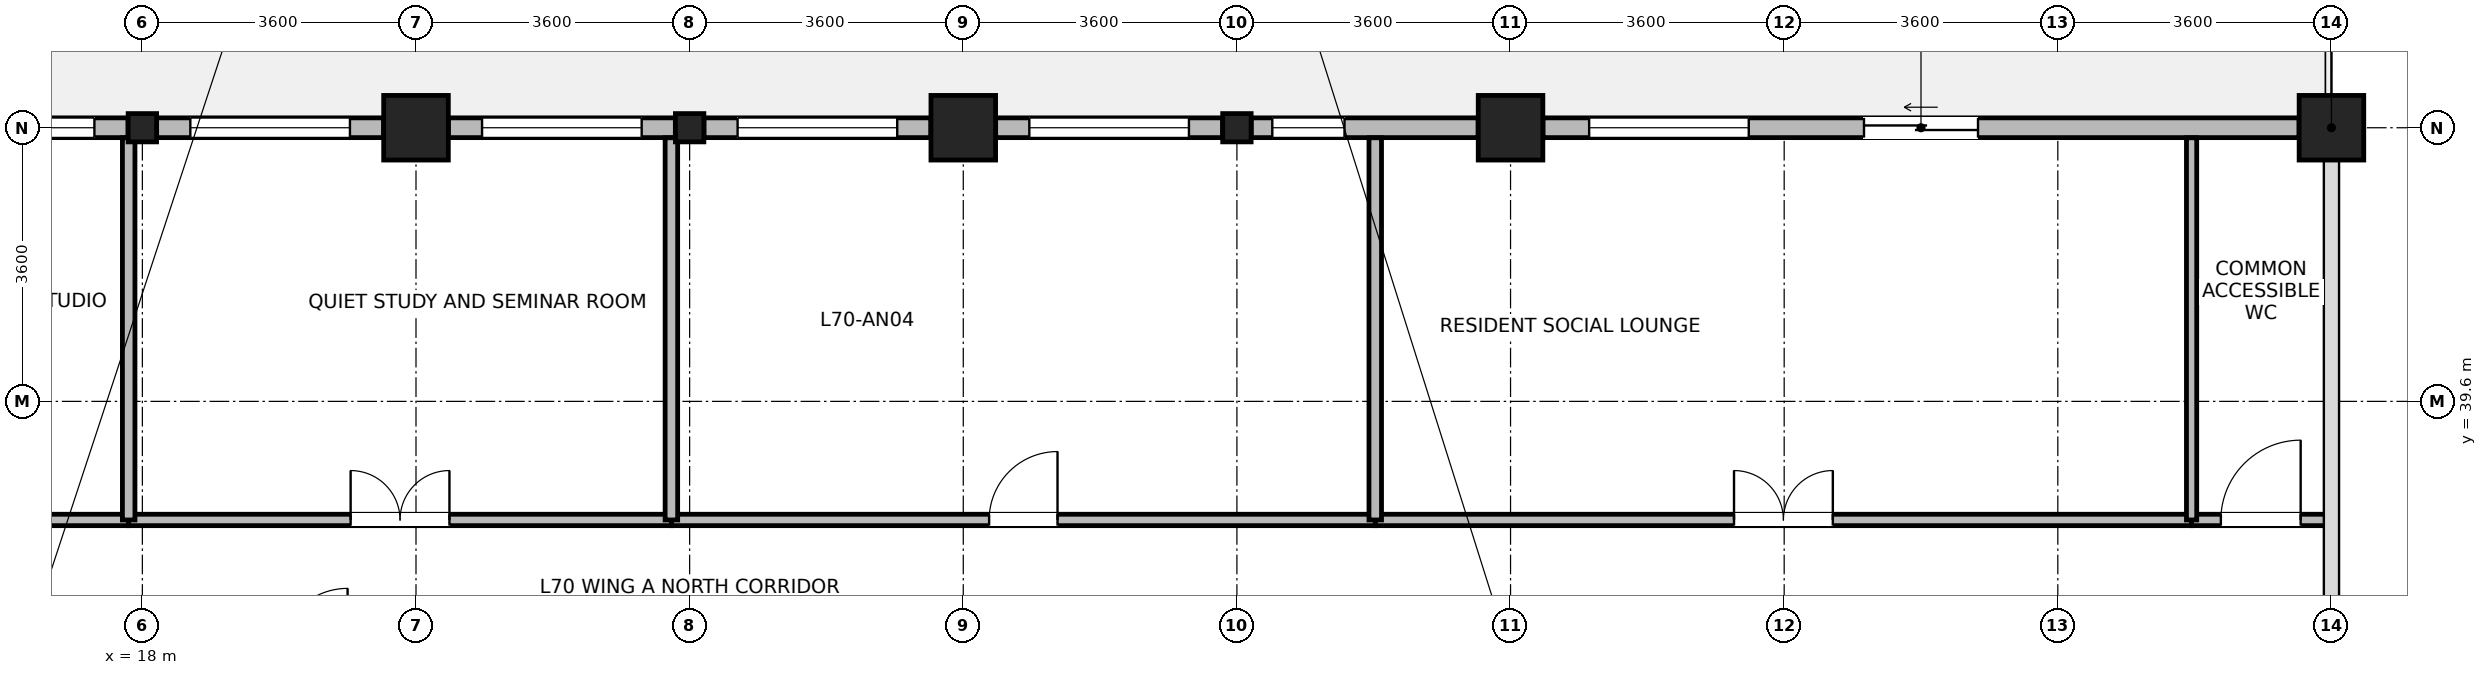
"""IFC4 building model, lengths in metres.
Left out: names, types, materials, properties, quantities, classifications, styles, units other than length and angle.
Written with IfcOpenShell. Run it as: python <this file> out.ifc"""

import sys

from ifc_helpers import new_model, si_unit, direction, frame, frame_2d, origin, origin_2d, place, context, subcontext, project, spatial, rectangle, i_section, extrude, source, transform, mapped, element, fill, save


model = new_model("IFC4")
c1 = context("Model", 3, precision=1e-05, world=origin(), true_north=direction((0.0, 1.0)))
c2 = subcontext(c1, "Body", "Model", "MODEL_VIEW")
j1 = project(units=[si_unit("LENGTHUNIT", "METRE"), si_unit("PLANEANGLEUNIT", "RADIAN")], contexts=[c1])
p1 = place(None, origin())
s1 = spatial("IfcSite", under=j1, at=p1, CompositionType="ELEMENT")
p2 = place(p1, origin())
s2 = spatial("IfcBuilding", under=s1, at=p2, CompositionType="ELEMENT")
p3 = place(p2, frame((0.0, 0.0, 272.1)))
s3 = spatial("IfcBuildingStorey", under=s2, at=p3, CompositionType="ELEMENT", Elevation=272.1)
m1 = source(origin(), c2, "Body", "SweptSolid", [
    extrude(rectangle(XDim=0.85, YDim=0.85, at=origin_2d()), origin(), (0.0, 0.0, 1.0), 3.7),
])
for number, where, z_axis, x_axis in (
    (1, (21.6, 43.2, 0.0), (0.0, 0.0, 1.0), (1.0, 0.0, 0.0)),
    (2, (28.8, 43.2, 0.0), (0.0, 0.0, 1.0), (1.0, 0.0, 0.0)),
    (3, (36.0, 43.2, 0.0), (0.0, 0.0, 1.0), (1.0, 0.0, 0.0)),
    (4, (46.8, 43.2, 0.0), (0.0, 0.0, 1.0), (1.0, 0.0, 0.0)),
):
    element("IfcColumn", number, at=place(p3, frame(where, z_axis=z_axis, x_axis=x_axis)), inside=s3, PredefinedType="COLUMN", context=c2, shape_type="MappedRepresentation", body=[
        mapped(m1, transform((0.0, 0.0, 0.0), x_axis=(1.0, 0.0, 0.0), y_axis=(0.0, 1.0, 0.0), z_axis=(0.0, 0.0, 1.0), scale=1.0)),
    ])
m2 = source(origin(), c2, "Body", "SweptSolid", [
    extrude(i_section(OverallWidth=0.374, OverallDepth=0.372, WebThickness=0.015, FlangeThickness=0.026, FilletRadius=0.015, at=origin_2d()), origin(), (0.0, 0.0, 1.0), 3.7),
])
for number, where, z_axis, x_axis in (
    (5, (18.0, 43.2, 0.0), (0.0, 0.0, 1.0), (1.0, 0.0, 0.0)),
    (6, (25.2, 43.2, 0.0), (0.0, 0.0, 1.0), (1.0, 0.0, 0.0)),
    (7, (32.4, 43.2, 0.0), (0.0, 0.0, 1.0), (1.0, 0.0, 0.0)),
):
    element("IfcColumn", number, at=place(p3, frame(where, z_axis=z_axis, x_axis=x_axis)), inside=s3, PredefinedType="COLUMN", context=c2, shape_type="MappedRepresentation", body=[
        mapped(m2, transform((0.0, 0.0, 0.0), x_axis=(1.0, 0.0, 0.0), y_axis=(0.0, 1.0, 0.0), z_axis=(0.0, 0.0, 1.0), scale=1.0)),
    ])
p4 = place(p3, frame((36.426, 43.2, 0.0), z_axis=(0.0, 0.0, 1.0), x_axis=(1.0, 0.0, 0.0)))
e8 = element("IfcWall", 8, at=p4, inside=s3, PredefinedType="STANDARD", context=c2, shape_type="SweptSolid", body=[
    extrude(rectangle(XDim=9.948, YDim=0.26, at=frame_2d((4.974, 0.0))), origin(), (0.0, 0.0, 1.0), 3.055),
])
p5 = place(p4, frame((4.224, 0.0, 0.0)))
e9 = element("IfcOpeningElement", 9, at=p5, cuts=e8, PredefinedType="OPENING", context=c2, shape_type="SweptSolid", body=[
    extrude(rectangle(XDim=1.5, YDim=2.15, at=frame_2d((0.75, 1.075))), frame((0.0, 0.14, 0.0), z_axis=(0.0, -1.0, 0.0), x_axis=(1.0, 0.0, 0.0)), (0.0, 0.0, 1.0), 0.28),
])
p6 = place(p4, frame((0.608, 0.0, 0.85)))
e10 = element("IfcOpeningElement", 10, at=p6, cuts=e8, PredefinedType="OPENING", context=c2, shape_type="SweptSolid", body=[
    extrude(rectangle(XDim=2.1, YDim=1.95, at=frame_2d((1.05, 0.975))), frame((0.0, 0.14, 0.0), z_axis=(0.0, -1.0, 0.0), x_axis=(1.0, 0.0, 0.0)), (0.0, 0.0, 1.0), 0.28),
])
p7 = place(p3, frame((32.588, 43.2, 0.0), z_axis=(0.0, 0.0, 1.0), x_axis=(1.0, 0.0, 0.0)))
e11 = element("IfcWall", 11, at=p7, inside=s3, PredefinedType="STANDARD", context=c2, shape_type="SweptSolid", body=[
    extrude(rectangle(XDim=2.986, YDim=0.26, at=frame_2d((1.493, 0.0))), origin(), (0.0, 0.0, 1.0), 3.055),
])
p8 = place(p7, frame((0.278, 0.0, 0.85)))
e12 = element("IfcOpeningElement", 12, at=p8, cuts=e11, PredefinedType="OPENING", context=c2, shape_type="SweptSolid", body=[
    extrude(rectangle(XDim=0.95, YDim=1.75, at=frame_2d((0.475, 0.875))), frame((0.0, 0.14, 0.0), z_axis=(0.0, -1.0, 0.0), x_axis=(1.0, 0.0, 0.0)), (0.0, 0.0, 1.0), 0.28),
])
p9 = place(p3, frame((29.226, 43.2, 0.0), z_axis=(0.0, 0.0, 1.0), x_axis=(1.0, 0.0, 0.0)))
e13 = element("IfcWall", 13, at=p9, inside=s3, PredefinedType="STANDARD", context=c2, shape_type="SweptSolid", body=[
    extrude(rectangle(XDim=2.986, YDim=0.26, at=frame_2d((1.493, 0.0))), origin(), (0.0, 0.0, 1.0), 3.055),
])
p10 = place(p9, frame((0.443, 0.0, 0.85)))
e14 = element("IfcOpeningElement", 14, at=p10, cuts=e13, PredefinedType="OPENING", context=c2, shape_type="SweptSolid", body=[
    extrude(rectangle(XDim=2.1, YDim=1.95, at=frame_2d((1.05, 0.975))), frame((0.0, 0.14, 0.0), z_axis=(0.0, -1.0, 0.0), x_axis=(1.0, 0.0, 0.0)), (0.0, 0.0, 1.0), 0.28),
])
p11 = place(p3, frame((25.388, 43.2, 0.0), z_axis=(0.0, 0.0, 1.0), x_axis=(1.0, 0.0, 0.0)))
e15 = element("IfcWall", 15, at=p11, inside=s3, PredefinedType="STANDARD", context=c2, shape_type="SweptSolid", body=[
    extrude(rectangle(XDim=2.986, YDim=0.26, at=frame_2d((1.493, 0.0))), origin(), (0.0, 0.0, 1.0), 3.055),
])
p12 = place(p11, frame((0.443, 0.0, 0.85)))
e16 = element("IfcOpeningElement", 16, at=p12, cuts=e15, PredefinedType="OPENING", context=c2, shape_type="SweptSolid", body=[
    extrude(rectangle(XDim=2.1, YDim=1.95, at=frame_2d((1.05, 0.975))), frame((0.0, 0.14, 0.0), z_axis=(0.0, -1.0, 0.0), x_axis=(1.0, 0.0, 0.0)), (0.0, 0.0, 1.0), 0.28),
])
p13 = place(p3, frame((22.026, 43.2, 0.0), z_axis=(0.0, 0.0, 1.0), x_axis=(1.0, 0.0, 0.0)))
e17 = element("IfcWall", 17, at=p13, inside=s3, PredefinedType="STANDARD", context=c2, shape_type="SweptSolid", body=[
    extrude(rectangle(XDim=2.986, YDim=0.26, at=frame_2d((1.493, 0.0))), origin(), (0.0, 0.0, 1.0), 3.055),
])
p14 = place(p13, frame((0.443, 0.0, 0.85)))
e18 = element("IfcOpeningElement", 18, at=p14, cuts=e17, PredefinedType="OPENING", context=c2, shape_type="SweptSolid", body=[
    extrude(rectangle(XDim=2.1, YDim=1.95, at=frame_2d((1.05, 0.975))), frame((0.0, 0.14, 0.0), z_axis=(0.0, -1.0, 0.0), x_axis=(1.0, 0.0, 0.0)), (0.0, 0.0, 1.0), 0.28),
])
p15 = place(p3, frame((18.188, 43.2, 0.0), z_axis=(0.0, 0.0, 1.0), x_axis=(1.0, 0.0, 0.0)))
e19 = element("IfcWall", 19, at=p15, inside=s3, PredefinedType="STANDARD", context=c2, shape_type="SweptSolid", body=[
    extrude(rectangle(XDim=2.986, YDim=0.26, at=frame_2d((1.493, 0.0))), origin(), (0.0, 0.0, 1.0), 3.055),
])
p16 = place(p15, frame((0.443, 0.0, 0.85)))
e20 = element("IfcOpeningElement", 20, at=p16, cuts=e19, PredefinedType="OPENING", context=c2, shape_type="SweptSolid", body=[
    extrude(rectangle(XDim=2.1, YDim=1.95, at=frame_2d((1.05, 0.975))), frame((0.0, 0.14, 0.0), z_axis=(0.0, -1.0, 0.0), x_axis=(1.0, 0.0, 0.0)), (0.0, 0.0, 1.0), 0.28),
])
p17 = place(p3, frame((14.826, 43.2, 0.0), z_axis=(0.0, 0.0, 1.0), x_axis=(1.0, 0.0, 0.0)))
e21 = element("IfcWall", 21, at=p17, inside=s3, PredefinedType="STANDARD", context=c2, shape_type="SweptSolid", body=[
    extrude(rectangle(XDim=2.986, YDim=0.26, at=frame_2d((1.493, 0.0))), origin(), (0.0, 0.0, 1.0), 3.055),
])
p18 = place(p17, frame((0.443, 0.0, 0.85)))
e22 = element("IfcOpeningElement", 22, at=p18, cuts=e21, PredefinedType="OPENING", context=c2, shape_type="SweptSolid", body=[
    extrude(rectangle(XDim=2.1, YDim=1.95, at=frame_2d((1.05, 0.975))), frame((0.0, 0.14, 0.0), z_axis=(0.0, -1.0, 0.0), x_axis=(1.0, 0.0, 0.0)), (0.0, 0.0, 1.0), 0.28),
])
p19 = place(p3, frame((34.22, 38.04, 0.0), z_axis=(0.0, 0.0, 1.0), x_axis=(1.0, 0.0, 0.0)))
e23 = element("IfcWall", 23, at=p19, inside=s3, PredefinedType="PARTITIONING", context=c2, shape_type="SweptSolid", body=[
    extrude(rectangle(XDim=10.74, YDim=0.15, at=frame_2d((5.37, 0.0))), origin(), (0.0, 0.0, 1.0), 3.455),
])
p20 = place(p19, frame((4.72, 0.0, 0.0)))
e24 = element("IfcOpeningElement", 24, at=p20, cuts=e23, PredefinedType="OPENING", context=c2, shape_type="SweptSolid", body=[
    extrude(rectangle(XDim=1.3, YDim=2.12, at=frame_2d((0.65, 1.06))), frame((0.0, 0.085, 0.0), z_axis=(0.0, -1.0, 0.0), x_axis=(1.0, 0.0, 0.0)), (0.0, 0.0, 1.0), 0.17),
])
p21 = place(p3, frame((24.96, 38.04, 0.0), z_axis=(0.0, 0.0, 1.0), x_axis=(1.0, 0.0, 0.0)))
e25 = element("IfcWall", 25, at=p21, inside=s3, PredefinedType="PARTITIONING", context=c2, shape_type="SweptSolid", body=[
    extrude(rectangle(XDim=9.26, YDim=0.15, at=frame_2d((4.63, 0.0))), origin(), (0.0, 0.0, 1.0), 3.455),
])
p22 = place(p21, frame((4.18, 0.0, 0.0)))
e26 = element("IfcOpeningElement", 26, at=p22, cuts=e25, PredefinedType="OPENING", context=c2, shape_type="SweptSolid", body=[
    extrude(rectangle(XDim=0.9, YDim=2.08, at=frame_2d((0.45, 1.04))), frame((0.0, 0.085, 0.0), z_axis=(0.0, -1.0, 0.0), x_axis=(1.0, 0.0, 0.0)), (0.0, 0.0, 1.0), 0.17),
])
p23 = place(p3, frame((10.12, 38.04, 0.0), z_axis=(0.0, 0.0, 1.0), x_axis=(1.0, 0.0, 0.0)))
e27 = element("IfcWall", 27, at=p23, inside=s3, PredefinedType="PARTITIONING", context=c2, shape_type="SweptSolid", body=[
    extrude(rectangle(XDim=7.7, YDim=0.15, at=frame_2d((3.85, 0.0))), origin(), (0.0, 0.0, 1.0), 3.455),
])
p24 = place(p23, frame((3.325, 0.0, 0.0)))
e28 = element("IfcOpeningElement", 28, at=p24, cuts=e27, PredefinedType="OPENING", context=c2, shape_type="SweptSolid", body=[
    extrude(rectangle(XDim=1.05, YDim=2.12, at=frame_2d((0.525, 1.06))), frame((0.0, 0.085, 0.0), z_axis=(0.0, -1.0, 0.0), x_axis=(1.0, 0.0, 0.0)), (0.0, 0.0, 1.0), 0.17),
])
p25 = place(p3, frame((17.82, 38.04, 0.0), z_axis=(0.0, 0.0, 1.0), x_axis=(1.0, 0.0, 0.0)))
e29 = element("IfcWall", 29, at=p25, inside=s3, PredefinedType="PARTITIONING", context=c2, shape_type="SweptSolid", body=[
    extrude(rectangle(XDim=7.14, YDim=0.15, at=frame_2d((3.57, 0.0))), origin(), (0.0, 0.0, 1.0), 3.455),
])
p26 = place(p25, frame((2.92, 0.0, 0.0)))
e30 = element("IfcOpeningElement", 30, at=p26, cuts=e29, PredefinedType="OPENING", context=c2, shape_type="SweptSolid", body=[
    extrude(rectangle(XDim=1.3, YDim=2.12, at=frame_2d((0.65, 1.06))), frame((0.0, 0.085, 0.0), z_axis=(0.0, -1.0, 0.0), x_axis=(1.0, 0.0, 0.0)), (0.0, 0.0, 1.0), 0.17),
])
p27 = place(p3, frame((44.96, 38.04, 0.0), z_axis=(0.0, 0.0, 1.0), x_axis=(1.0, 0.0, 0.0)))
e31 = element("IfcWall", 31, at=p27, inside=s3, PredefinedType="PARTITIONING", context=c2, shape_type="SweptSolid", body=[
    extrude(rectangle(XDim=1.82, YDim=0.15, at=frame_2d((0.91, 0.0))), origin(), (0.0, 0.0, 1.0), 3.455),
])
p28 = place(p27, frame((0.385, 0.0, 0.0)))
e32 = element("IfcOpeningElement", 32, at=p28, cuts=e31, PredefinedType="OPENING", context=c2, shape_type="SweptSolid", body=[
    extrude(rectangle(XDim=1.05, YDim=2.12, at=frame_2d((0.525, 1.06))), frame((0.0, 0.085, 0.0), z_axis=(0.0, -1.0, 0.0), x_axis=(1.0, 0.0, 0.0)), (0.0, 0.0, 1.0), 0.17),
])
p29 = place(p3, frame((17.82, 38.04, 0.0), z_axis=(0.0, 0.0, 1.0), x_axis=(0.0, 1.0, 0.0)))
e33 = element("IfcWall", 33, at=p29, inside=s3, PredefinedType="PARTITIONING", context=c2, shape_type="SweptSolid", body=[
    extrude(rectangle(XDim=5.028, YDim=0.165, at=frame_2d((2.514, 0.0))), origin(), (0.0, 0.0, 1.0), 3.215),
])
for number, where, z_axis, x_axis in (
    (34, (24.96, 38.04, 0.0), (0.0, 0.0, 1.0), (0.0, 1.0, 0.0)),
    (35, (34.22, 38.04, 0.0), (0.0, 0.0, 1.0), (0.0, 1.0, 0.0)),
):
    element("IfcWall", number, at=place(p3, frame(where, z_axis=z_axis, x_axis=x_axis)), inside=s3, PredefinedType="PARTITIONING", context=c2, shape_type="SweptSolid", body=[
        extrude(rectangle(XDim=5.028, YDim=0.165, at=frame_2d((2.514, 0.0))), origin(), (0.0, 0.0, 1.0), 3.455),
    ])
p30 = place(p3, frame((44.96, 38.04, 0.0), z_axis=(0.0, 0.0, 1.0), x_axis=(0.0, 1.0, 0.0)))
e36 = element("IfcWall", 36, at=p30, inside=s3, PredefinedType="PARTITIONING", context=c2, shape_type="SweptSolid", body=[
    extrude(rectangle(XDim=5.028, YDim=0.135, at=frame_2d((2.514, 0.0))), origin(), (0.0, 0.0, 1.0), 3.455),
])
p31 = place(p5, origin())
e37 = element("IfcDoor", 37, at=p31, inside=s3, OperationType="SLIDING_TO_LEFT", PredefinedType="DOOR", context=c2, shape_type="SweptSolid", body=[
    extrude(rectangle(XDim=1.5, YDim=2.15, at=frame_2d((0.75, 1.075))), frame((0.0, 0.025, 0.0), z_axis=(0.0, -1.0, 0.0), x_axis=(1.0, 0.0, 0.0)), (0.0, 0.0, 1.0), 0.05),
])
fill(e9, e37)
p32 = place(p6, origin())
e38 = element("IfcWindow", 38, at=p32, inside=s3, PartitioningType="SINGLE_PANEL", PredefinedType="WINDOW", context=c2, shape_type="SweptSolid", body=[
    extrude(rectangle(XDim=2.1, YDim=1.95, at=frame_2d((1.05, 0.975))), frame((0.0, 0.03, 0.0), z_axis=(0.0, -1.0, 0.0), x_axis=(1.0, 0.0, 0.0)), (0.0, 0.0, 1.0), 0.06),
])
fill(e10, e38)
p33 = place(p8, origin())
e39 = element("IfcWindow", 39, at=p33, inside=s3, PartitioningType="SINGLE_PANEL", PredefinedType="WINDOW", context=c2, shape_type="SweptSolid", body=[
    extrude(rectangle(XDim=0.95, YDim=1.75, at=frame_2d((0.475, 0.875))), frame((0.0, 0.03, 0.0), z_axis=(0.0, -1.0, 0.0), x_axis=(1.0, 0.0, 0.0)), (0.0, 0.0, 1.0), 0.06),
])
fill(e12, e39)
p34 = place(p10, origin())
e40 = element("IfcWindow", 40, at=p34, inside=s3, PartitioningType="SINGLE_PANEL", PredefinedType="WINDOW", context=c2, shape_type="SweptSolid", body=[
    extrude(rectangle(XDim=2.1, YDim=1.95, at=frame_2d((1.05, 0.975))), frame((0.0, 0.03, 0.0), z_axis=(0.0, -1.0, 0.0), x_axis=(1.0, 0.0, 0.0)), (0.0, 0.0, 1.0), 0.06),
])
fill(e14, e40)
p35 = place(p12, origin())
e41 = element("IfcWindow", 41, at=p35, inside=s3, PartitioningType="SINGLE_PANEL", PredefinedType="WINDOW", context=c2, shape_type="SweptSolid", body=[
    extrude(rectangle(XDim=2.1, YDim=1.95, at=frame_2d((1.05, 0.975))), frame((0.0, 0.03, 0.0), z_axis=(0.0, -1.0, 0.0), x_axis=(1.0, 0.0, 0.0)), (0.0, 0.0, 1.0), 0.06),
])
fill(e16, e41)
p36 = place(p14, origin())
e42 = element("IfcWindow", 42, at=p36, inside=s3, PartitioningType="SINGLE_PANEL", PredefinedType="WINDOW", context=c2, shape_type="SweptSolid", body=[
    extrude(rectangle(XDim=2.1, YDim=1.95, at=frame_2d((1.05, 0.975))), frame((0.0, 0.03, 0.0), z_axis=(0.0, -1.0, 0.0), x_axis=(1.0, 0.0, 0.0)), (0.0, 0.0, 1.0), 0.06),
])
fill(e18, e42)
p37 = place(p16, origin())
e43 = element("IfcWindow", 43, at=p37, inside=s3, PartitioningType="SINGLE_PANEL", PredefinedType="WINDOW", context=c2, shape_type="SweptSolid", body=[
    extrude(rectangle(XDim=2.1, YDim=1.95, at=frame_2d((1.05, 0.975))), frame((0.0, 0.03, 0.0), z_axis=(0.0, -1.0, 0.0), x_axis=(1.0, 0.0, 0.0)), (0.0, 0.0, 1.0), 0.06),
])
fill(e20, e43)
p38 = place(p18, origin())
e44 = element("IfcWindow", 44, at=p38, inside=s3, PartitioningType="SINGLE_PANEL", PredefinedType="WINDOW", context=c2, shape_type="SweptSolid", body=[
    extrude(rectangle(XDim=2.1, YDim=1.95, at=frame_2d((1.05, 0.975))), frame((0.0, 0.03, 0.0), z_axis=(0.0, -1.0, 0.0), x_axis=(1.0, 0.0, 0.0)), (0.0, 0.0, 1.0), 0.06),
])
fill(e22, e44)
p39 = place(p20, origin())
e45 = element("IfcDoor", 45, at=p39, inside=s3, OperationType="DOUBLE_DOOR_SINGLE_SWING", PredefinedType="DOOR", context=c2, shape_type="SweptSolid", body=[
    extrude(rectangle(XDim=1.3, YDim=2.12, at=frame_2d((0.65, 1.06))), frame((0.0, 0.025, 0.0), z_axis=(0.0, -1.0, 0.0), x_axis=(1.0, 0.0, 0.0)), (0.0, 0.0, 1.0), 0.05),
])
fill(e24, e45)
p40 = place(p22, origin())
e46 = element("IfcDoor", 46, at=p40, inside=s3, OperationType="SINGLE_SWING_RIGHT", PredefinedType="DOOR", context=c2, shape_type="SweptSolid", body=[
    extrude(rectangle(XDim=0.9, YDim=2.08, at=frame_2d((0.45, 1.04))), frame((0.0, 0.025, 0.0), z_axis=(0.0, -1.0, 0.0), x_axis=(1.0, 0.0, 0.0)), (0.0, 0.0, 1.0), 0.05),
])
fill(e26, e46)
p41 = place(p26, origin())
e47 = element("IfcDoor", 47, at=p41, inside=s3, OperationType="DOUBLE_DOOR_SINGLE_SWING", PredefinedType="DOOR", context=c2, shape_type="SweptSolid", body=[
    extrude(rectangle(XDim=1.3, YDim=2.12, at=frame_2d((0.65, 1.06))), frame((0.0, 0.025, 0.0), z_axis=(0.0, -1.0, 0.0), x_axis=(1.0, 0.0, 0.0)), (0.0, 0.0, 1.0), 0.05),
])
fill(e30, e47)
p42 = place(p28, origin())
e48 = element("IfcDoor", 48, at=p42, inside=s3, OperationType="SINGLE_SWING_RIGHT", PredefinedType="DOOR", context=c2, shape_type="SweptSolid", body=[
    extrude(rectangle(XDim=1.05, YDim=2.12, at=frame_2d((0.525, 1.06))), frame((0.0, 0.025, 0.0), z_axis=(0.0, -1.0, 0.0), x_axis=(1.0, 0.0, 0.0)), (0.0, 0.0, 1.0), 0.05),
])
fill(e32, e48)
save(model, sys.argv[1])
